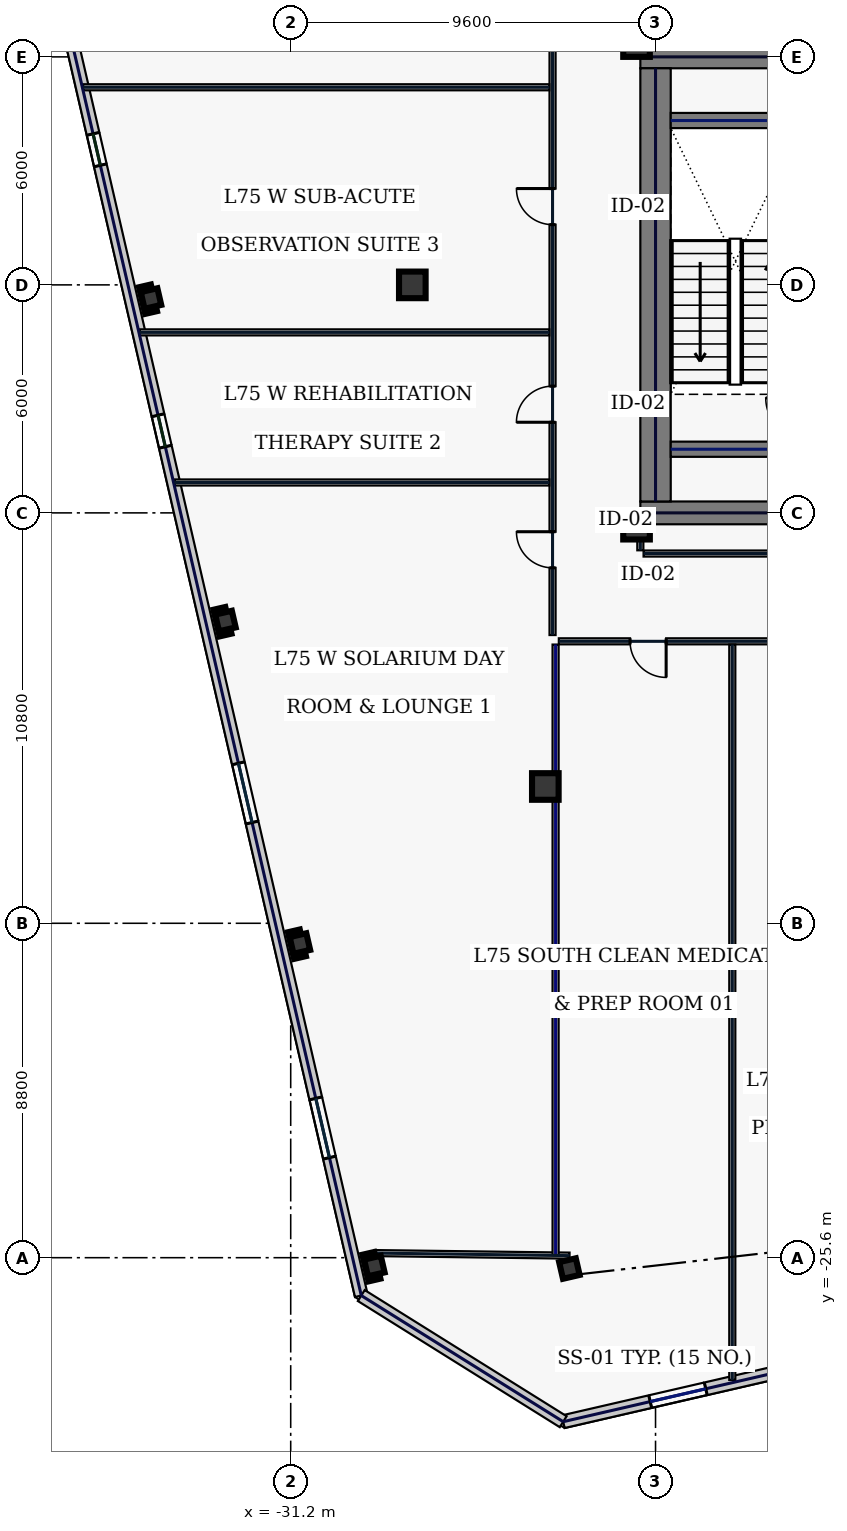
"""IFC4 building model, lengths in metres.
Left out: names, types, materials, properties, quantities, classifications, styles, units other than length and angle.
Written with IfcOpenShell. Run it as: python <this file> out.ifc"""

import sys

from ifc_helpers import new_model, si_unit, direction, frame, frame_2d, origin, origin_2d, place, context, subcontext, project, spatial, rectangle, hollow_rectangle, extrude, element, fill, save


model = new_model("IFC4")
c1 = context("Model", 3, precision=1e-05, world=origin(), true_north=direction((0.0, 1.0)))
c2 = subcontext(c1, "Body", "Model", "MODEL_VIEW")
j1 = project(units=[si_unit("LENGTHUNIT", "METRE"), si_unit("PLANEANGLEUNIT", "RADIAN")], contexts=[c1])
p1 = place(None, origin())
s1 = spatial("IfcSite", under=j1, at=p1, CompositionType="ELEMENT")
p2 = place(p1, origin())
s2 = spatial("IfcBuilding", under=s1, at=p2, CompositionType="ELEMENT")
p3 = place(p2, frame((0.0, 0.0, 321.0)))
s3 = spatial("IfcBuildingStorey", under=s2, at=p3, CompositionType="ELEMENT", Elevation=321.0)
for number, where, z_axis, x_axis in (
    (1, (-22.0, 6.0, 0.0), (0.0, 0.0, 1.0), (1.0, 0.0, 0.0)),
    (2, (-22.0, -6.0, 0.0), (0.0, 0.0, 1.0), (1.0, 0.0, 0.0)),
):
    element("IfcWall", number, at=place(p3, frame(where, z_axis=z_axis, x_axis=x_axis)), inside=s3, PredefinedType="SHEAR", context=c2, shape_type="SweptSolid", body=[
        extrude(rectangle(XDim=11.5, YDim=0.6, at=frame_2d((5.75, 0.0))), origin(), (0.0, 0.0, 1.0), 3.74),
    ])
p4 = place(p3, frame((-21.6, -5.7, 0.0), z_axis=(0.0, 0.0, 1.0), x_axis=(0.0, 1.0, 0.0)))
e3 = element("IfcWall", 3, at=p4, inside=s3, PredefinedType="SHEAR", context=c2, shape_type="SweptSolid", body=[
    extrude(rectangle(XDim=11.4, YDim=0.8, at=frame_2d((5.7, 0.0))), origin(), (0.0, 0.0, 1.0), 3.74),
])
for number, where, z_axis, x_axis in (
    (4, (-21.2, -4.325, 0.0), (0.0, 0.0, 1.0), (1.0, 0.0, 0.0)),
    (5, (-21.2, 4.325, 0.0), (0.0, 0.0, 1.0), (1.0, 0.0, 0.0)),
):
    element("IfcWall", number, at=place(p3, frame(where, z_axis=z_axis, x_axis=x_axis)), inside=s3, PredefinedType="SHEAR", context=c2, shape_type="SweptSolid", body=[
        extrude(rectangle(XDim=3.4, YDim=0.4, at=frame_2d((1.7, 0.0))), origin(), (0.0, 0.0, 1.0), 3.74),
    ])
for number, where, z_axis, x_axis in (
    (6, (-22.1, -6.35, 0.0), (0.0, 0.0, 1.0), (1.0, 0.0, 0.0)),
    (7, (-22.1, 6.35, 0.0), (0.0, 0.0, 1.0), (1.0, 0.0, 0.0)),
    (8, (-24.5, -13.2, 0.0), (0.0, 0.0, 1.0), (1.0, 0.0, 0.0)),
    (9, (-28.0, 0.0, 0.0), (0.0, 0.0, 1.0), (1.0, 0.0, 0.0)),
):
    element("IfcColumn", number, at=place(p3, frame(where, z_axis=z_axis, x_axis=x_axis)), inside=s3, PredefinedType="COLUMN", context=c2, shape_type="SweptSolid", body=[
        extrude(hollow_rectangle(XDim=0.7, YDim=0.7, WallThickness=0.032, at=origin_2d()), origin(), (0.0, 0.0, 1.0), 3.74),
    ])
for number, where, z_axis, x_axis in (
    (10, (-23.867, -25.886, 0.0), (0.0, 0.0, 1.0), (0.974, 0.225, 0.0)),
    (11, (-34.877, -0.359, 0.0), (0.0, 0.0, 1.0), (0.974, 0.225, 0.0)),
    (12, (-32.917, -8.845, 0.0), (0.0, 0.0, 1.0), (0.974, 0.225, 0.0)),
    (13, (-30.958, -17.332, 0.0), (0.0, 0.0, 1.0), (0.974, 0.225, 0.0)),
    (14, (-28.999, -25.819, 0.0), (0.0, 0.0, 1.0), (0.974, 0.225, 0.0)),
):
    element("IfcColumn", number, at=place(p3, frame(where, z_axis=z_axis, x_axis=x_axis)), inside=s3, PredefinedType="COLUMN", context=c2, shape_type="SweptSolid", body=[
        extrude(hollow_rectangle(XDim=0.45, YDim=0.45, WallThickness=0.022, at=origin_2d()), origin(), (0.0, 0.0, 1.0), 3.74),
    ])
p5 = place(p3, frame((-24.03, -29.916, 0.0), z_axis=(0.0, 0.0, 1.0), x_axis=(0.974370978061, 0.224947098473, 0.0)))
e15 = element("IfcWall", 15, at=p5, inside=s3, PredefinedType="STANDARD", context=c2, shape_type="SweptSolid", body=[
    extrude(rectangle(XDim=17.506, YDim=0.34, at=frame_2d((8.753, 0.0))), origin(), (0.0, 0.0, 1.0), 3.74),
])
p6 = place(p5, frame((2.35, 0.0, 0.9)))
e16 = element("IfcOpeningElement", 16, at=p6, cuts=e15, PredefinedType="OPENING", context=c2, shape_type="SweptSolid", body=[
    extrude(rectangle(XDim=1.5, YDim=2.0, at=frame_2d((0.75, 1.0))), frame((0.0, 0.18, 0.0), z_axis=(0.0, -1.0, 0.0), x_axis=(1.0, 0.0, 0.0)), (0.0, 0.0, 1.0), 0.36),
])
p7 = place(p5, frame((5.817, 0.0, 0.9)))
e17 = element("IfcOpeningElement", 17, at=p7, cuts=e15, PredefinedType="OPENING", context=c2, shape_type="SweptSolid", body=[
    extrude(rectangle(XDim=1.5, YDim=2.0, at=frame_2d((0.75, 1.0))), frame((0.0, 0.18, 0.0), z_axis=(0.0, -1.0, 0.0), x_axis=(1.0, 0.0, 0.0)), (0.0, 0.0, 1.0), 0.36),
])
p8 = place(p5, frame((9.886, 0.0, 0.9)))
e18 = element("IfcOpeningElement", 18, at=p8, cuts=e15, PredefinedType="OPENING", context=c2, shape_type="SweptSolid", body=[
    extrude(rectangle(XDim=1.5, YDim=2.0, at=frame_2d((0.75, 1.0))), frame((0.0, 0.18, 0.0), z_axis=(0.0, -1.0, 0.0), x_axis=(1.0, 0.0, 0.0)), (0.0, 0.0, 1.0), 0.36),
])
p9 = place(p5, frame((13.353, 0.0, 0.9)))
e19 = element("IfcOpeningElement", 19, at=p9, cuts=e15, PredefinedType="OPENING", context=c2, shape_type="SweptSolid", body=[
    extrude(rectangle(XDim=1.5, YDim=2.0, at=frame_2d((0.75, 1.0))), frame((0.0, 0.18, 0.0), z_axis=(0.0, -1.0, 0.0), x_axis=(1.0, 0.0, 0.0)), (0.0, 0.0, 1.0), 0.36),
])
p10 = place(p3, frame((-37.486, 8.676, 0.0), z_axis=(0.0, 0.0, 1.0), x_axis=(0.224953091034, -0.974369594576, 0.0)))
e20 = element("IfcWall", 20, at=p10, inside=s3, PredefinedType="STANDARD", context=c2, shape_type="SweptSolid", body=[
    extrude(rectangle(XDim=36.2, YDim=0.34, at=frame_2d((18.1, 0.0))), origin(), (0.0, 0.0, 1.0), 3.74),
])
p11 = place(p10, frame((4.825, 0.0, 0.75)))
e21 = element("IfcOpeningElement", 21, at=p11, cuts=e20, PredefinedType="OPENING", context=c2, shape_type="SweptSolid", body=[
    extrude(rectangle(XDim=0.85, YDim=1.85, at=frame_2d((0.425, 0.925))), frame((0.0, 0.18, 0.0), z_axis=(0.0, -1.0, 0.0), x_axis=(1.0, 0.0, 0.0)), (0.0, 0.0, 1.0), 0.36),
])
p12 = place(p10, frame((12.425, 0.0, 0.75)))
e22 = element("IfcOpeningElement", 22, at=p12, cuts=e20, PredefinedType="OPENING", context=c2, shape_type="SweptSolid", body=[
    extrude(rectangle(XDim=0.85, YDim=1.85, at=frame_2d((0.425, 0.925))), frame((0.0, 0.18, 0.0), z_axis=(0.0, -1.0, 0.0), x_axis=(1.0, 0.0, 0.0)), (0.0, 0.0, 1.0), 0.36),
])
p13 = place(p10, frame((21.825, 0.0, 0.58)))
e23 = element("IfcOpeningElement", 23, at=p13, cuts=e20, PredefinedType="OPENING", context=c2, shape_type="SweptSolid", body=[
    extrude(rectangle(XDim=1.6, YDim=2.3, at=frame_2d((0.8, 1.15))), frame((0.0, 0.18, 0.0), z_axis=(0.0, -1.0, 0.0), x_axis=(1.0, 0.0, 0.0)), (0.0, 0.0, 1.0), 0.36),
])
p14 = place(p10, frame((30.875, 0.0, 0.58)))
e24 = element("IfcOpeningElement", 24, at=p14, cuts=e20, PredefinedType="OPENING", context=c2, shape_type="SweptSolid", body=[
    extrude(rectangle(XDim=1.6, YDim=2.3, at=frame_2d((0.8, 1.15))), frame((0.0, 0.18, 0.0), z_axis=(0.0, -1.0, 0.0), x_axis=(1.0, 0.0, 0.0)), (0.0, 0.0, 1.0), 0.36),
])
p15 = place(p3, frame((-29.343, -26.596, 0.0), z_axis=(0.0, 0.0, 1.0), x_axis=(0.848037708252, -0.529935887993, 0.0)))
e25 = element("IfcWall", 25, at=p15, inside=s3, PredefinedType="STANDARD", context=c2, shape_type="SweptSolid", body=[
    extrude(rectangle(XDim=6.265, YDim=0.34, at=frame_2d((3.133, 0.0))), origin(), (0.0, 0.0, 1.0), 3.74),
])
p16 = place(p3, frame((-28.994, -25.479, 0.0), z_axis=(0.0, 0.0, 1.0), x_axis=(0.999915052546, -0.01303409726, 0.0)))
e26 = element("IfcWall", 26, at=p16, inside=s3, PredefinedType="PARTITIONING", context=c2, shape_type="SweptSolid", body=[
    extrude(rectangle(XDim=5.132, YDim=0.16, at=frame_2d((2.566, 0.0))), origin(), (0.0, 0.0, 1.0), 3.74),
])
p17 = place(p3, frame((-24.31, -9.215, 0.0), z_axis=(0.0, 0.0, 1.0), x_axis=(0.0, 1.0, 0.0)))
e27 = element("IfcWall", 27, at=p17, inside=s3, PredefinedType="PARTITIONING", context=c2, shape_type="SweptSolid", body=[
    extrude(rectangle(XDim=18.63, YDim=0.16, at=frame_2d((9.315, 0.0))), origin(), (0.0, 0.0, 1.0), 3.74),
])
p18 = place(p17, frame((1.769, 0.0, 0.0)))
e28 = element("IfcOpeningElement", 28, at=p18, cuts=e27, PredefinedType="OPENING", context=c2, shape_type="SweptSolid", body=[
    extrude(rectangle(XDim=0.95, YDim=2.2, at=frame_2d((0.475, 1.1))), frame((0.0, 0.09, 0.0), z_axis=(0.0, -1.0, 0.0), x_axis=(1.0, 0.0, 0.0)), (0.0, 0.0, 1.0), 0.18),
])
p19 = place(p17, frame((5.6, 0.0, 0.0)))
e29 = element("IfcOpeningElement", 29, at=p19, cuts=e27, PredefinedType="OPENING", context=c2, shape_type="SweptSolid", body=[
    extrude(rectangle(XDim=0.95, YDim=2.2, at=frame_2d((0.475, 1.1))), frame((0.0, 0.09, 0.0), z_axis=(0.0, -1.0, 0.0), x_axis=(1.0, 0.0, 0.0)), (0.0, 0.0, 1.0), 0.18),
])
p20 = place(p17, frame((10.8, 0.0, 0.0)))
e30 = element("IfcOpeningElement", 30, at=p20, cuts=e27, PredefinedType="OPENING", context=c2, shape_type="SweptSolid", body=[
    extrude(rectangle(XDim=0.95, YDim=2.2, at=frame_2d((0.475, 1.1))), frame((0.0, 0.09, 0.0), z_axis=(0.0, -1.0, 0.0), x_axis=(1.0, 0.0, 0.0)), (0.0, 0.0, 1.0), 0.18),
])
p21 = place(p17, frame((15.981, 0.0, 0.0)))
e31 = element("IfcOpeningElement", 31, at=p21, cuts=e27, PredefinedType="OPENING", context=c2, shape_type="SweptSolid", body=[
    extrude(rectangle(XDim=0.95, YDim=2.2, at=frame_2d((0.475, 1.1))), frame((0.0, 0.09, 0.0), z_axis=(0.0, -1.0, 0.0), x_axis=(1.0, 0.0, 0.0)), (0.0, 0.0, 1.0), 0.18),
])
p22 = place(p3, frame((-15.065, -9.38, 0.0), z_axis=(0.0, 0.0, 1.0), x_axis=(-1.0, 0.0, 0.0)))
e32 = element("IfcWall", 32, at=p22, inside=s3, PredefinedType="PARTITIONING", context=c2, shape_type="SweptSolid", body=[
    extrude(rectangle(XDim=9.08, YDim=0.16, at=frame_2d((4.54, 0.0))), origin(), (0.0, 0.0, 1.0), 3.74),
])
p23 = place(p22, frame((6.256, 0.0, 0.0)))
e33 = element("IfcOpeningElement", 33, at=p23, cuts=e32, PredefinedType="OPENING", context=c2, shape_type="SweptSolid", body=[
    extrude(rectangle(XDim=0.95, YDim=2.2, at=frame_2d((0.475, 1.1))), frame((0.0, 0.09, 0.0), z_axis=(0.0, -1.0, 0.0), x_axis=(1.0, 0.0, 0.0)), (0.0, 0.0, 1.0), 0.18),
])
p24 = place(p3, frame((-22.0, -6.42, 0.0), z_axis=(0.0, 0.0, 1.0), x_axis=(0.0, -1.0, 0.0)))
e34 = element("IfcWall", 34, at=p24, inside=s3, PredefinedType="PARTITIONING", context=c2, shape_type="SweptSolid", body=[
    extrude(rectangle(XDim=0.565, YDim=0.16, at=frame_2d((0.283, 0.0))), origin(), (0.0, 0.0, 1.0), 3.74),
])
p25 = place(p3, frame((-21.915, -7.07, 0.0), z_axis=(0.0, 0.0, 1.0), x_axis=(1.0, 0.0, 0.0)))
e35 = element("IfcWall", 35, at=p25, inside=s3, PredefinedType="PARTITIONING", context=c2, shape_type="SweptSolid", body=[
    extrude(rectangle(XDim=11.2, YDim=0.16, at=frame_2d((5.6, 0.0))), origin(), (0.0, 0.0, 1.0), 3.74),
])
p26 = place(p3, frame((-24.23, -25.536, 0.0), z_axis=(0.0, 0.0, 1.0), x_axis=(0.0, 1.0, 0.0)))
e36 = element("IfcWall", 36, at=p26, inside=s3, PredefinedType="PARTITIONING", context=c2, shape_type="SweptSolid", body=[
    extrude(rectangle(XDim=16.071, YDim=0.16, at=frame_2d((8.035, 0.0))), origin(), (0.0, 0.0, 1.0), 3.335),
])
p27 = place(p3, frame((-19.58, -28.817, 0.0), z_axis=(0.0, 0.0, 1.0), x_axis=(0.0, 1.0, 0.0)))
e37 = element("IfcWall", 37, at=p27, inside=s3, PredefinedType="PARTITIONING", context=c2, shape_type="SweptSolid", body=[
    extrude(rectangle(XDim=19.352, YDim=0.16, at=frame_2d((9.676, 0.0))), origin(), (0.0, 0.0, 1.0), 3.74),
])
p28 = place(p3, frame((-34.262, -5.2, 0.0), z_axis=(0.0, 0.0, 1.0), x_axis=(1.0, 0.0, 0.0)))
e38 = element("IfcWall", 38, at=p28, inside=s3, PredefinedType="PARTITIONING", context=c2, shape_type="SweptSolid", body=[
    extrude(rectangle(XDim=9.867, YDim=0.16, at=frame_2d((4.933, 0.0))), origin(), (0.0, 0.0, 1.0), 3.74),
])
p29 = place(p3, frame((-35.174, -1.25, 0.0), z_axis=(0.0, 0.0, 1.0), x_axis=(1.0, 0.0, 0.0)))
e39 = element("IfcWall", 39, at=p29, inside=s3, PredefinedType="PARTITIONING", context=c2, shape_type="SweptSolid", body=[
    extrude(rectangle(XDim=10.779, YDim=0.16, at=frame_2d((5.389, 0.0))), origin(), (0.0, 0.0, 1.0), 3.74),
])
p30 = place(p3, frame((-36.663, 5.2, 0.0), z_axis=(0.0, 0.0, 1.0), x_axis=(1.0, 0.0, 0.0)))
e40 = element("IfcWall", 40, at=p30, inside=s3, PredefinedType="PARTITIONING", context=c2, shape_type="SweptSolid", body=[
    extrude(rectangle(XDim=12.268, YDim=0.16, at=frame_2d((6.134, 0.0))), origin(), (0.0, 0.0, 1.0), 3.74),
])
p31 = place(p6, origin())
e41 = element("IfcWindow", 41, at=p31, inside=s3, PartitioningType="SINGLE_PANEL", PredefinedType="WINDOW", context=c2, shape_type="SweptSolid", body=[
    extrude(rectangle(XDim=1.5, YDim=2.0, at=frame_2d((0.75, 1.0))), frame((0.0, 0.03, 0.0), z_axis=(0.0, -1.0, 0.0), x_axis=(1.0, 0.0, 0.0)), (0.0, 0.0, 1.0), 0.06),
])
fill(e16, e41)
p32 = place(p11, origin())
e42 = element("IfcWindow", 42, at=p32, inside=s3, PartitioningType="SINGLE_PANEL", PredefinedType="WINDOW", context=c2, shape_type="SweptSolid", body=[
    extrude(rectangle(XDim=0.85, YDim=1.85, at=frame_2d((0.425, 0.925))), frame((0.0, 0.03, 0.0), z_axis=(0.0, -1.0, 0.0), x_axis=(1.0, 0.0, 0.0)), (0.0, 0.0, 1.0), 0.06),
])
fill(e21, e42)
p33 = place(p12, origin())
e43 = element("IfcWindow", 43, at=p33, inside=s3, PartitioningType="SINGLE_PANEL", PredefinedType="WINDOW", context=c2, shape_type="SweptSolid", body=[
    extrude(rectangle(XDim=0.85, YDim=1.85, at=frame_2d((0.425, 0.925))), frame((0.0, 0.03, 0.0), z_axis=(0.0, -1.0, 0.0), x_axis=(1.0, 0.0, 0.0)), (0.0, 0.0, 1.0), 0.06),
])
fill(e22, e43)
p34 = place(p13, origin())
e44 = element("IfcWindow", 44, at=p34, inside=s3, PartitioningType="SINGLE_PANEL", PredefinedType="WINDOW", context=c2, shape_type="SweptSolid", body=[
    extrude(rectangle(XDim=1.6, YDim=2.3, at=frame_2d((0.8, 1.15))), frame((0.0, 0.03, 0.0), z_axis=(0.0, -1.0, 0.0), x_axis=(1.0, 0.0, 0.0)), (0.0, 0.0, 1.0), 0.06),
])
fill(e23, e44)
p35 = place(p14, origin())
e45 = element("IfcWindow", 45, at=p35, inside=s3, PartitioningType="SINGLE_PANEL", PredefinedType="WINDOW", context=c2, shape_type="SweptSolid", body=[
    extrude(rectangle(XDim=1.6, YDim=2.3, at=frame_2d((0.8, 1.15))), frame((0.0, 0.03, 0.0), z_axis=(0.0, -1.0, 0.0), x_axis=(1.0, 0.0, 0.0)), (0.0, 0.0, 1.0), 0.06),
])
fill(e24, e45)
p36 = place(p23, origin())
e46 = element("IfcDoor", 46, at=p36, inside=s3, OperationType="SINGLE_SWING_LEFT", PredefinedType="DOOR", context=c2, shape_type="SweptSolid", body=[
    extrude(rectangle(XDim=0.95, YDim=2.2, at=frame_2d((0.475, 1.1))), frame((0.0, 0.025, 0.0), z_axis=(0.0, -1.0, 0.0), x_axis=(1.0, 0.0, 0.0)), (0.0, 0.0, 1.0), 0.05),
])
fill(e33, e46)
p37 = place(p18, origin())
e47 = element("IfcDoor", 47, at=p37, inside=s3, OperationType="SINGLE_SWING_RIGHT", PredefinedType="DOOR", context=c2, shape_type="SweptSolid", body=[
    extrude(rectangle(XDim=0.95, YDim=2.2, at=frame_2d((0.475, 1.1))), frame((0.0, 0.025, 0.0), z_axis=(0.0, -1.0, 0.0), x_axis=(1.0, 0.0, 0.0)), (0.0, 0.0, 1.0), 0.05),
])
fill(e28, e47)
p38 = place(p19, origin())
e48 = element("IfcDoor", 48, at=p38, inside=s3, OperationType="SINGLE_SWING_LEFT", PredefinedType="DOOR", context=c2, shape_type="SweptSolid", body=[
    extrude(rectangle(XDim=0.95, YDim=2.2, at=frame_2d((0.475, 1.1))), frame((0.0, 0.025, 0.0), z_axis=(0.0, -1.0, 0.0), x_axis=(1.0, 0.0, 0.0)), (0.0, 0.0, 1.0), 0.05),
])
fill(e29, e48)
p39 = place(p20, origin())
e49 = element("IfcDoor", 49, at=p39, inside=s3, OperationType="SINGLE_SWING_RIGHT", PredefinedType="DOOR", context=c2, shape_type="SweptSolid", body=[
    extrude(rectangle(XDim=0.95, YDim=2.2, at=frame_2d((0.475, 1.1))), frame((0.0, 0.025, 0.0), z_axis=(0.0, -1.0, 0.0), x_axis=(1.0, 0.0, 0.0)), (0.0, 0.0, 1.0), 0.05),
])
fill(e30, e49)
save(model, sys.argv[1])
